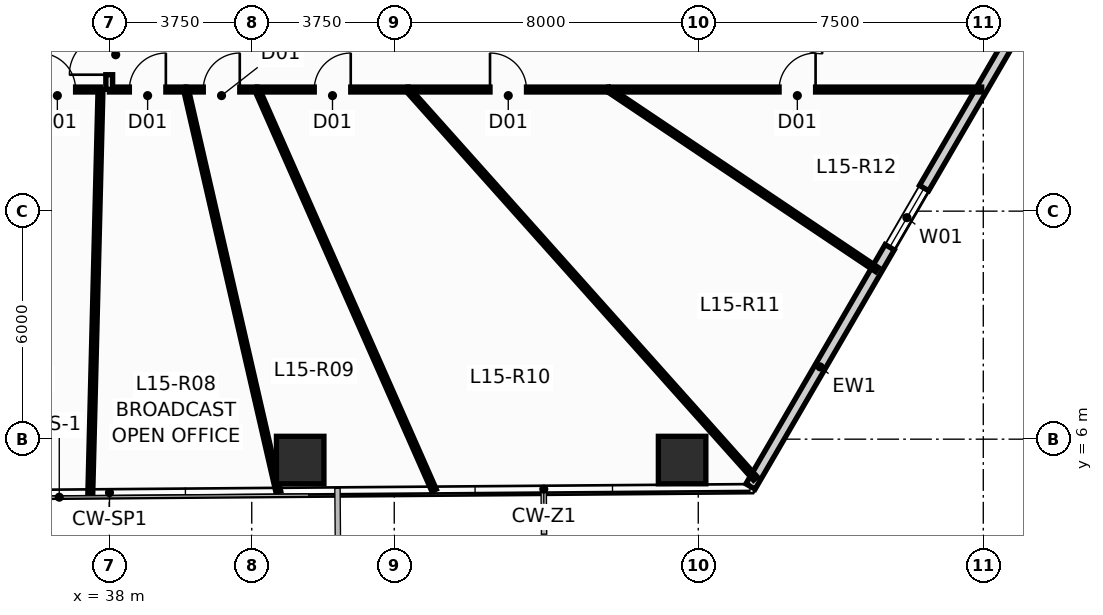
"""IFC4 building model, lengths in metres.
Left out: names, types, materials, properties, quantities, classifications, styles, units other than length and angle.
Written with IfcOpenShell. Run it as: python <this file> out.ifc"""

import sys

from ifc_helpers import new_model, si_unit, direction, frame, frame_2d, origin, origin_2d, place, context, subcontext, project, spatial, rectangle, hollow_rectangle, extrude, source, transform, mapped, element, fill, save


model = new_model("IFC4")
c1 = context("Model", 3, precision=1e-05, world=origin(), true_north=direction((0.0, 1.0)))
c2 = subcontext(c1, "Body", "Model", "MODEL_VIEW")
j1 = project(units=[si_unit("LENGTHUNIT", "METRE"), si_unit("PLANEANGLEUNIT", "RADIAN")], contexts=[c1])
p1 = place(None, origin())
s1 = spatial("IfcSite", under=j1, at=p1, CompositionType="ELEMENT")
p2 = place(p1, origin())
s2 = spatial("IfcBuilding", under=s1, at=p2, CompositionType="ELEMENT")
p3 = place(p2, frame((0.0, 0.0, 60.45)))
s3 = spatial("IfcBuildingStorey", under=s2, at=p3, CompositionType="ELEMENT", Elevation=60.45)
m1 = source(origin(), c2, "Body", "SweptSolid", [
    extrude(hollow_rectangle(XDim=1.25, YDim=1.25, WallThickness=0.07, at=origin_2d()), origin(), (0.0, 0.0, 1.0), 3.651),
])
p4 = place(p3, frame((43.025, 5.451, 0.0), z_axis=(0.004480382638, 0.019793929266, 0.999794042058), x_axis=(-0.975326687046, 0.220766513622, 0.0)))
e1 = element("IfcColumn", 1, at=p4, inside=s3, PredefinedType="COLUMN", context=c2, shape_type="MappedRepresentation", body=[
    mapped(m1, transform((0.0, 0.0, 0.0), scale=1.0)),
])
m2 = source(origin(), c2, "Body", "SweptSolid", [
    extrude(hollow_rectangle(XDim=1.25, YDim=1.25, WallThickness=0.07, at=origin_2d()), origin(), (0.0, 0.0, 1.0), 3.651),
])
p5 = place(p3, frame((53.075, 5.451, 0.0), z_axis=(0.013440068782, 0.019792340097, 0.999713772949), x_axis=(-0.827290216258, 0.561774775229, 0.0)))
e2 = element("IfcColumn", 2, at=p5, inside=s3, PredefinedType="COLUMN", context=c2, shape_type="MappedRepresentation", body=[
    mapped(m2, transform((0.0, 0.0, 0.0), scale=1.0)),
])
p6 = place(p3, frame((63.104, 18.899, 0.0), z_axis=(0.0, 0.0, 1.0), x_axis=(-0.502893983591, -0.864348101906, 0.0)))
e3 = element("IfcWall", 3, at=p6, inside=s3, PredefinedType="STANDARD", context=c2, shape_type="SweptSolid", body=[
    extrude(rectangle(XDim=16.365, YDim=0.28, at=frame_2d((8.183, 0.0))), origin(), (0.0, 0.0, 1.0), 3.4),
])
p7 = place(p6, frame((7.28, 0.0, 0.9)))
e4 = element("IfcOpeningElement", 4, at=p7, cuts=e3, PredefinedType="OPENING", context=c2, shape_type="SweptSolid", body=[
    extrude(rectangle(XDim=1.8, YDim=1.8, at=frame_2d((0.9, 0.9))), frame((0.0, 0.152, 0.0), z_axis=(0.0, -1.0, 0.0), x_axis=(1.0, 0.0, 0.0)), (0.0, 0.0, 1.0), 0.304),
])
p8 = place(p3, frame((45.863, 15.196, 0.0), z_axis=(0.0, 0.0, 1.0), x_axis=(0.666222978662, -0.745752601539, 0.0)))
e5 = element("IfcWall", 5, at=p8, inside=s3, PredefinedType="PARTITIONING", context=c2, shape_type="SweptSolid", body=[
    extrude(rectangle(XDim=13.719, YDim=0.13, at=frame_2d((6.859, 0.0))), origin(), (0.0, 0.0, 1.0), 2.783),
])
p9 = place(p3, frame((41.892, 15.195, 0.0), z_axis=(0.0, 0.0, 1.0), x_axis=(0.40406694801, -0.914729414377, 0.0)))
e6 = element("IfcWall", 6, at=p9, inside=s3, PredefinedType="PARTITIONING", context=c2, shape_type="SweptSolid", body=[
    extrude(rectangle(XDim=11.521, YDim=0.13, at=frame_2d((5.76, 0.0))), origin(), (0.0, 0.0, 1.0), 3.4),
])
p10 = place(p3, frame((40.021, 15.195, 0.0), z_axis=(0.0, 0.0, 1.0), x_axis=(0.223798979191, -0.97463532509, 0.0)))
e7 = element("IfcWall", 7, at=p10, inside=s3, PredefinedType="PARTITIONING", context=c2, shape_type="SweptSolid", body=[
    extrude(rectangle(XDim=10.846, YDim=0.13, at=frame_2d((5.423, 0.0))), origin(), (0.0, 0.0, 1.0), 3.4),
])
p11 = place(p3, frame((37.502, 4.585, 0.0), z_axis=(0.0, 0.0, 1.0), x_axis=(0.025211156136, 0.999682148288, 0.0)))
e8 = element("IfcWall", 8, at=p11, inside=s3, PredefinedType="PARTITIONING", context=c2, shape_type="SweptSolid", body=[
    extrude(rectangle(XDim=10.614, YDim=0.13, at=frame_2d((5.307, 0.0))), origin(), (0.0, 0.0, 1.0), 3.4),
])
p12 = place(p3, frame((51.145, 15.2, 0.0), z_axis=(0.0, 0.0, 1.0), x_axis=(1.0, 0.0, 0.0)))
e9 = element("IfcWall", 9, at=p12, inside=s3, PredefinedType="PARTITIONING", context=c2, shape_type="SweptSolid", body=[
    extrude(rectangle(XDim=9.812, YDim=0.13, at=frame_2d((4.906, 0.0))), origin(), (0.0, 0.0, 1.0), 3.4),
])
p13 = place(p12, frame((4.482, 0.0, 0.0)))
e10 = element("IfcOpeningElement", 10, at=p13, cuts=e9, PredefinedType="OPENING", context=c2, shape_type="SweptSolid", body=[
    extrude(rectangle(XDim=0.96, YDim=2.15, at=frame_2d((0.48, 1.075))), frame((0.0, 0.077, 0.0), z_axis=(0.0, -1.0, 0.0), x_axis=(1.0, 0.0, 0.0)), (0.0, 0.0, 1.0), 0.154),
])
p14 = place(p3, frame((51.144, 15.197, 0.0), z_axis=(0.0, 0.0, 1.0), x_axis=(0.830446891932, -0.557097800822, 0.0)))
e11 = element("IfcWall", 11, at=p14, inside=s3, PredefinedType="PARTITIONING", context=c2, shape_type="SweptSolid", body=[
    extrude(rectangle(XDim=8.498, YDim=0.13, at=frame_2d((4.249, 0.0))), origin(), (0.0, 0.0, 1.0), 3.4),
])
p15 = place(p3, frame((45.865, 15.2, 0.0), z_axis=(0.0, 0.0, 1.0), x_axis=(1.0, 0.0, 0.0)))
e12 = element("IfcWall", 12, at=p15, inside=s3, PredefinedType="PARTITIONING", context=c2, shape_type="SweptSolid", body=[
    extrude(rectangle(XDim=5.27, YDim=0.13, at=frame_2d((2.635, 0.0))), origin(), (0.0, 0.0, 1.0), 3.4),
])
p16 = place(p15, frame((2.155, 0.0, 0.0)))
e13 = element("IfcOpeningElement", 13, at=p16, cuts=e12, PredefinedType="OPENING", context=c2, shape_type="SweptSolid", body=[
    extrude(rectangle(XDim=0.96, YDim=2.15, at=frame_2d((0.48, 1.075))), frame((0.0, 0.077, 0.0), z_axis=(0.0, -1.0, 0.0), x_axis=(1.0, 0.0, 0.0)), (0.0, 0.0, 1.0), 0.154),
])
p17 = place(p3, frame((41.895, 15.2, 0.0), z_axis=(0.0, 0.0, 1.0), x_axis=(1.0, 0.0, 0.0)))
e14 = element("IfcWall", 14, at=p17, inside=s3, PredefinedType="PARTITIONING", context=c2, shape_type="SweptSolid", body=[
    extrude(rectangle(XDim=3.96, YDim=0.13, at=frame_2d((1.98, 0.0))), origin(), (0.0, 0.0, 1.0), 3.026),
])
p18 = place(p17, frame((1.5, 0.0, 0.0)))
e15 = element("IfcOpeningElement", 15, at=p18, cuts=e14, PredefinedType="OPENING", context=c2, shape_type="SweptSolid", body=[
    extrude(rectangle(XDim=0.96, YDim=2.15, at=frame_2d((0.48, 1.075))), frame((0.0, 0.077, 0.0), z_axis=(0.0, -1.0, 0.0), x_axis=(1.0, 0.0, 0.0)), (0.0, 0.0, 1.0), 0.154),
])
p19 = place(p3, frame((35.505, 15.2, 0.0), z_axis=(0.0, 0.0, 1.0), x_axis=(1.0, 0.0, 0.0)))
e16 = element("IfcWall", 16, at=p19, inside=s3, PredefinedType="PARTITIONING", context=c2, shape_type="SweptSolid", body=[
    extrude(rectangle(XDim=2.26, YDim=0.13, at=frame_2d((1.13, 0.0))), origin(), (0.0, 0.0, 1.0), 3.026),
])
p20 = place(p19, frame((0.65, 0.0, 0.0)))
e17 = element("IfcOpeningElement", 17, at=p20, cuts=e16, PredefinedType="OPENING", context=c2, shape_type="SweptSolid", body=[
    extrude(rectangle(XDim=0.96, YDim=2.15, at=frame_2d((0.48, 1.075))), frame((0.0, 0.077, 0.0), z_axis=(0.0, -1.0, 0.0), x_axis=(1.0, 0.0, 0.0)), (0.0, 0.0, 1.0), 0.154),
])
p21 = place(p3, frame((38.005, 15.2, 0.0), z_axis=(0.0, 0.0, 1.0), x_axis=(1.0, 0.0, 0.0)))
e18 = element("IfcWall", 18, at=p21, inside=s3, PredefinedType="PARTITIONING", context=c2, shape_type="SweptSolid", body=[
    extrude(rectangle(XDim=2.01, YDim=0.13, at=frame_2d((1.005, 0.0))), origin(), (0.0, 0.0, 1.0), 3.026),
])
p22 = place(p21, frame((0.525, 0.0, 0.0)))
e19 = element("IfcOpeningElement", 19, at=p22, cuts=e18, PredefinedType="OPENING", context=c2, shape_type="SweptSolid", body=[
    extrude(rectangle(XDim=0.96, YDim=2.15, at=frame_2d((0.48, 1.075))), frame((0.0, 0.077, 0.0), z_axis=(0.0, -1.0, 0.0), x_axis=(1.0, 0.0, 0.0)), (0.0, 0.0, 1.0), 0.154),
])
p23 = place(p3, frame((38.0, 15.205, 0.0), z_axis=(0.0, 0.0, 1.0), x_axis=(0.0, 1.0, 0.0)))
e20 = element("IfcWall", 20, at=p23, inside=s3, PredefinedType="PARTITIONING", context=c2, shape_type="SweptSolid", body=[
    extrude(rectangle(XDim=1.82, YDim=0.18, at=frame_2d((0.91, 0.0))), origin(), (0.0, 0.0, 1.0), 3.4),
])
p24 = place(p23, frame((0.385, 0.0, 0.0)))
e21 = element("IfcOpeningElement", 21, at=p24, cuts=e20, PredefinedType="OPENING", context=c2, shape_type="SweptSolid", body=[
    extrude(rectangle(XDim=1.05, YDim=2.15, at=frame_2d((0.525, 1.075))), frame((0.0, 0.102, 0.0), z_axis=(0.0, -1.0, 0.0), x_axis=(1.0, 0.0, 0.0)), (0.0, 0.0, 1.0), 0.204),
])
p25 = place(p3, frame((40.025, 15.2, 0.0), z_axis=(0.0, 0.0, 1.0), x_axis=(1.0, 0.0, 0.0)))
e22 = element("IfcWall", 22, at=p25, inside=s3, PredefinedType="PARTITIONING", context=c2, shape_type="SweptSolid", body=[
    extrude(rectangle(XDim=1.86, YDim=0.13, at=frame_2d((0.93, 0.0))), origin(), (0.0, 0.0, 1.0), 3.026),
])
p26 = place(p25, frame((0.45, 0.0, 0.0)))
e23 = element("IfcOpeningElement", 23, at=p26, cuts=e22, PredefinedType="OPENING", context=c2, shape_type="SweptSolid", body=[
    extrude(rectangle(XDim=0.96, YDim=2.15, at=frame_2d((0.48, 1.075))), frame((0.0, 0.077, 0.0), z_axis=(0.0, -1.0, 0.0), x_axis=(1.0, 0.0, 0.0)), (0.0, 0.0, 1.0), 0.154),
])
p27 = place(p7, origin())
e24 = element("IfcWindow", 24, at=p27, inside=s3, PartitioningType="SINGLE_PANEL", PredefinedType="WINDOW", context=c2, shape_type="SweptSolid", body=[
    extrude(rectangle(XDim=1.8, YDim=1.8, at=frame_2d((0.9, 0.9))), frame((0.0, 0.03, 0.0), z_axis=(0.0, -1.0, 0.0), x_axis=(1.0, 0.0, 0.0)), (0.0, 0.0, 1.0), 0.06),
])
fill(e4, e24)
p28 = place(p13, origin())
e25 = element("IfcDoor", 25, at=p28, inside=s3, OperationType="SINGLE_SWING_RIGHT", PredefinedType="DOOR", context=c2, shape_type="SweptSolid", body=[
    extrude(rectangle(XDim=0.96, YDim=2.15, at=frame_2d((0.48, 1.075))), frame((0.0, 0.025, 0.0), z_axis=(0.0, -1.0, 0.0), x_axis=(1.0, 0.0, 0.0)), (0.0, 0.0, 1.0), 0.05),
])
fill(e10, e25)
p29 = place(p16, origin())
e26 = element("IfcDoor", 26, at=p29, inside=s3, OperationType="SINGLE_SWING_LEFT", PredefinedType="DOOR", context=c2, shape_type="SweptSolid", body=[
    extrude(rectangle(XDim=0.96, YDim=2.15, at=frame_2d((0.48, 1.075))), frame((0.0, 0.025, 0.0), z_axis=(0.0, -1.0, 0.0), x_axis=(1.0, 0.0, 0.0)), (0.0, 0.0, 1.0), 0.05),
])
fill(e13, e26)
p30 = place(p18, origin())
e27 = element("IfcDoor", 27, at=p30, inside=s3, OperationType="SINGLE_SWING_RIGHT", PredefinedType="DOOR", context=c2, shape_type="SweptSolid", body=[
    extrude(rectangle(XDim=0.96, YDim=2.15, at=frame_2d((0.48, 1.075))), frame((0.0, 0.025, 0.0), z_axis=(0.0, -1.0, 0.0), x_axis=(1.0, 0.0, 0.0)), (0.0, 0.0, 1.0), 0.05),
])
fill(e15, e27)
p31 = place(p20, origin())
e28 = element("IfcDoor", 28, at=p31, inside=s3, OperationType="SINGLE_SWING_LEFT", PredefinedType="DOOR", context=c2, shape_type="SweptSolid", body=[
    extrude(rectangle(XDim=0.96, YDim=2.15, at=frame_2d((0.48, 1.075))), frame((0.0, 0.025, 0.0), z_axis=(0.0, -1.0, 0.0), x_axis=(1.0, 0.0, 0.0)), (0.0, 0.0, 1.0), 0.05),
])
fill(e17, e28)
p32 = place(p22, origin())
e29 = element("IfcDoor", 29, at=p32, inside=s3, OperationType="SINGLE_SWING_RIGHT", PredefinedType="DOOR", context=c2, shape_type="SweptSolid", body=[
    extrude(rectangle(XDim=0.96, YDim=2.15, at=frame_2d((0.48, 1.075))), frame((0.0, 0.025, 0.0), z_axis=(0.0, -1.0, 0.0), x_axis=(1.0, 0.0, 0.0)), (0.0, 0.0, 1.0), 0.05),
])
fill(e19, e29)
p33 = place(p24, origin())
e30 = element("IfcDoor", 30, at=p33, inside=s3, OperationType="SINGLE_SWING_LEFT", PredefinedType="DOOR", context=c2, shape_type="SweptSolid", body=[
    extrude(rectangle(XDim=1.05, YDim=2.15, at=frame_2d((0.525, 1.075))), frame((0.0, 0.025, 0.0), z_axis=(0.0, -1.0, 0.0), x_axis=(1.0, 0.0, 0.0)), (0.0, 0.0, 1.0), 0.05),
])
fill(e21, e30)
p34 = place(p26, origin())
e31 = element("IfcDoor", 31, at=p34, inside=s3, OperationType="SINGLE_SWING_RIGHT", PredefinedType="DOOR", context=c2, shape_type="SweptSolid", body=[
    extrude(rectangle(XDim=0.96, YDim=2.15, at=frame_2d((0.48, 1.075))), frame((0.0, 0.025, 0.0), z_axis=(0.0, -1.0, 0.0), x_axis=(1.0, 0.0, 0.0)), (0.0, 0.0, 1.0), 0.05),
])
fill(e23, e31)
save(model, sys.argv[1])
